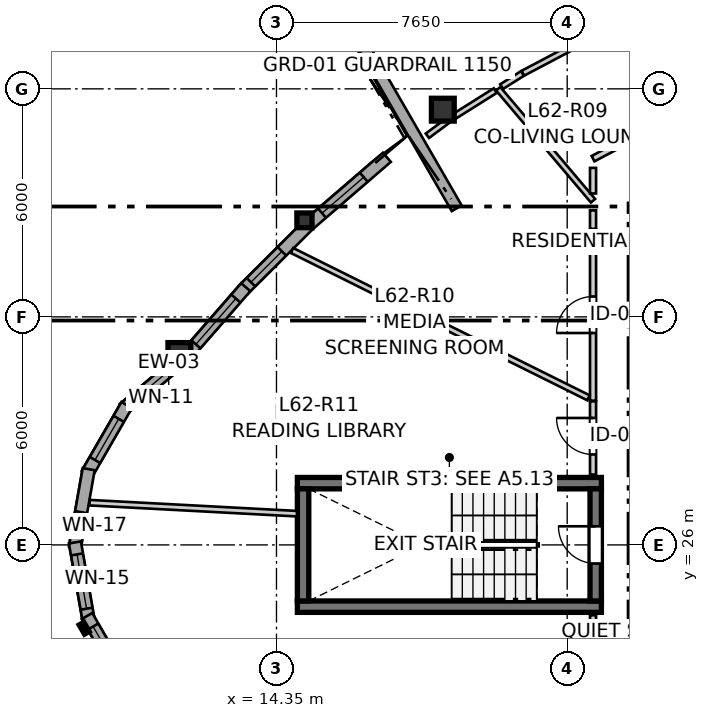
"""IFC4 building model, lengths in metres.
Left out: names, types, materials, properties, quantities, classifications, styles, units other than length and angle.
Written with IfcOpenShell. Run it as: python <this file> out.ifc"""

import sys

from ifc_helpers import new_model, si_unit, direction, frame, frame_2d, origin, origin_2d, place, context, subcontext, project, spatial, rectangle, i_section, extrude, source, transform, mapped, element, fill, save


model = new_model("IFC4")
c1 = context("Model", 3, precision=1e-05, world=origin(), true_north=direction((0.0, 1.0)))
c2 = subcontext(c1, "Body", "Model", "MODEL_VIEW")
j1 = project(units=[si_unit("LENGTHUNIT", "METRE"), si_unit("PLANEANGLEUNIT", "RADIAN")], contexts=[c1])
p1 = place(None, origin())
s1 = spatial("IfcSite", under=j1, at=p1, CompositionType="ELEMENT")
p2 = place(p1, origin())
s2 = spatial("IfcBuilding", under=s1, at=p2, CompositionType="ELEMENT")
p3 = place(p2, frame((0.0, 0.0, 208.4)))
s3 = spatial("IfcBuildingStorey", under=s2, at=p3, CompositionType="ELEMENT", Elevation=208.4)
for number, where, z_axis, x_axis in (
    (1, (14.9, 24.375, 0.0), (0.0, 0.0, 1.0), (1.0, 0.0, 0.0)),
    (2, (22.9, 27.625, 0.0), (0.0, 0.0, 1.0), (-1.0, 0.0, 0.0)),
):
    element("IfcWall", number, at=place(p3, frame(where, z_axis=z_axis, x_axis=x_axis)), inside=s3, PredefinedType="SHEAR", context=c2, shape_type="SweptSolid", body=[
        extrude(rectangle(XDim=8.0, YDim=0.3, at=frame_2d((4.0, 0.0))), origin(), (0.0, 0.0, 1.0), 2.935),
    ])
p4 = place(p3, frame((15.05, 27.475, 0.0), z_axis=(0.0, 0.0, 1.0), x_axis=(0.0, -1.0, 0.0)))
e3 = element("IfcWall", 3, at=p4, inside=s3, PredefinedType="SHEAR", context=c2, shape_type="SweptSolid", body=[
    extrude(rectangle(XDim=2.95, YDim=0.3, at=frame_2d((1.475, 0.0))), origin(), (0.0, 0.0, 1.0), 2.935),
])
p5 = place(p3, frame((22.75, 24.525, 0.0), z_axis=(0.0, 0.0, 1.0), x_axis=(0.0, 1.0, 0.0)))
e4 = element("IfcWall", 4, at=p5, inside=s3, PredefinedType="SHEAR", context=c2, shape_type="SweptSolid", body=[
    extrude(rectangle(XDim=2.95, YDim=0.3, at=frame_2d((1.475, 0.0))), origin(), (0.0, 0.0, 1.0), 2.935),
])
p6 = place(p5, frame((0.985, 0.0, 0.0)))
e5 = element("IfcOpeningElement", 5, at=p6, cuts=e4, PredefinedType="OPENING", context=c2, shape_type="SweptSolid", body=[
    extrude(rectangle(XDim=0.98, YDim=2.15, at=frame_2d((0.49, 1.075))), frame((0.0, 0.16, 0.0), z_axis=(0.0, -1.0, 0.0), x_axis=(1.0, 0.0, 0.0)), (0.0, 0.0, 1.0), 0.32),
])
m1 = source(origin(), c2, "Body", "SweptSolid", [
    extrude(rectangle(XDim=0.6, YDim=0.6, at=origin_2d()), origin(), (0.0, 0.0, 1.0), 2.935),
])
for number, where, z_axis, x_axis in (
    (6, (11.795, 31.023, 0.0), (0.0, 0.0, 1.0), (1.0, 0.0, 0.0)),
    (7, (18.727, 37.452, 0.0), (0.0, 0.0, 1.0), (1.0, 0.0, 0.0)),
):
    element("IfcColumn", number, at=place(p3, frame(where, z_axis=z_axis, x_axis=x_axis)), inside=s3, PredefinedType="COLUMN", context=c2, shape_type="MappedRepresentation", body=[
        mapped(m1, transform((0.0, 0.0, 0.0), x_axis=(1.0, 0.0, 0.0), y_axis=(0.0, 1.0, 0.0), z_axis=(0.0, 0.0, 1.0), scale=1.0)),
    ])
m2 = source(origin(), c2, "Body", "SweptSolid", [
    extrude(i_section(OverallWidth=0.398, OverallDepth=0.387, WebThickness=0.019, FlangeThickness=0.03, FilletRadius=0.015, at=origin_2d()), origin(), (0.0, 0.0, 1.0), 2.935),
])
p7 = place(p3, frame((15.086, 34.541, 0.0), z_axis=(0.0, 0.0, 1.0), x_axis=(1.0, 0.0, 0.0)))
e8 = element("IfcColumn", 8, at=p7, inside=s3, PredefinedType="PILASTER", context=c2, shape_type="MappedRepresentation", body=[
    mapped(m2, transform((0.0, 0.0, 0.0), x_axis=(1.0, 0.0, 0.0), y_axis=(0.0, 1.0, 0.0), z_axis=(0.0, 0.0, 1.0), scale=1.0)),
])
p8 = place(p3, frame((11.829, 30.843, 0.0), z_axis=(0.0, 0.0, 1.0), x_axis=(-0.76606505432, -0.642763045414, 0.0)))
e9 = element("IfcWall", 9, at=p8, inside=s3, PredefinedType="SOLIDWALL", context=c2, shape_type="SweptSolid", body=[
    extrude(rectangle(XDim=1.962, YDim=0.32, at=frame_2d((0.981, 0.0))), origin(), (0.0, 0.0, 1.0), 2.555),
])
p9 = place(p8, frame((0.391, 0.0, 0.82)))
e10 = element("IfcOpeningElement", 10, at=p9, cuts=e9, PredefinedType="OPENING", context=c2, shape_type="SweptSolid", body=[
    extrude(rectangle(XDim=1.25, YDim=1.35, at=frame_2d((0.625, 0.675))), frame((0.0, 0.17, 0.0), z_axis=(0.0, -1.0, 0.0), x_axis=(1.0, 0.0, 0.0)), (0.0, 0.0, 1.0), 0.34),
])
p10 = place(p3, frame((10.409, 29.681, 0.0), z_axis=(0.0, 0.0, 1.0), x_axis=(-0.49990781971, -0.866078617559, 0.0)))
e11 = element("IfcWall", 11, at=p10, inside=s3, PredefinedType="SOLIDWALL", context=c2, shape_type="SweptSolid", body=[
    extrude(rectangle(XDim=2.09, YDim=0.32, at=frame_2d((1.045, 0.0))), origin(), (0.0, 0.0, 1.0), 2.555),
])
p11 = place(p10, frame((0.42, 0.0, 0.82)))
e12 = element("IfcOpeningElement", 12, at=p11, cuts=e11, PredefinedType="OPENING", context=c2, shape_type="SweptSolid", body=[
    extrude(rectangle(XDim=1.25, YDim=1.35, at=frame_2d((0.625, 0.675))), frame((0.0, 0.17, 0.0), z_axis=(0.0, -1.0, 0.0), x_axis=(1.0, 0.0, 0.0)), (0.0, 0.0, 1.0), 0.34),
])
p12 = place(p3, frame((9.409, 27.993, 0.0), z_axis=(0.0, 0.0, 1.0), x_axis=(-0.173672066494, -0.984803540469, 0.0)))
e13 = element("IfcWall", 13, at=p12, inside=s3, PredefinedType="SOLIDWALL", context=c2, shape_type="SweptSolid", body=[
    extrude(rectangle(XDim=2.09, YDim=0.32, at=frame_2d((1.045, 0.0))), origin(), (0.0, 0.0, 1.0), 2.555),
])
p13 = place(p12, frame((1.149, 0.0, 0.82)))
e14 = element("IfcOpeningElement", 14, at=p13, cuts=e13, PredefinedType="OPENING", context=c2, shape_type="SweptSolid", body=[
    extrude(rectangle(XDim=0.58, YDim=1.35, at=frame_2d((0.29, 0.675))), frame((0.0, 0.17, 0.0), z_axis=(0.0, -1.0, 0.0), x_axis=(1.0, 0.0, 0.0)), (0.0, 0.0, 1.0), 0.34),
])
p14 = place(p3, frame((9.046, 26.065, 0.0), z_axis=(0.0, 0.0, 1.0), x_axis=(0.173672066494, -0.984803540469, 0.0)))
e15 = element("IfcWall", 15, at=p14, inside=s3, PredefinedType="SOLIDWALL", context=c2, shape_type="SweptSolid", body=[
    extrude(rectangle(XDim=2.09, YDim=0.32, at=frame_2d((1.045, 0.0))), origin(), (0.0, 0.0, 1.0), 2.555),
])
p15 = place(p14, frame((0.32, 0.0, 0.82)))
e16 = element("IfcOpeningElement", 16, at=p15, cuts=e15, PredefinedType="OPENING", context=c2, shape_type="SweptSolid", body=[
    extrude(rectangle(XDim=1.45, YDim=1.25, at=frame_2d((0.725, 0.625))), frame((0.0, 0.17, 0.0), z_axis=(0.0, -1.0, 0.0), x_axis=(1.0, 0.0, 0.0)), (0.0, 0.0, 1.0), 0.34),
])
p16 = place(p3, frame((9.365, 24.129, 0.0), z_axis=(0.0, 0.0, 1.0), x_axis=(0.49990781971, -0.866078617559, 0.0)))
e17 = element("IfcWall", 17, at=p16, inside=s3, PredefinedType="SOLIDWALL", context=c2, shape_type="SweptSolid", body=[
    extrude(rectangle(XDim=2.09, YDim=0.32, at=frame_2d((1.045, 0.0))), origin(), (0.0, 0.0, 1.0), 2.555),
])
p17 = place(p16, frame((0.32, 0.0, 0.82)))
e18 = element("IfcOpeningElement", 18, at=p17, cuts=e17, PredefinedType="OPENING", context=c2, shape_type="SweptSolid", body=[
    extrude(rectangle(XDim=1.45, YDim=1.25, at=frame_2d((0.725, 0.625))), frame((0.0, 0.17, 0.0), z_axis=(0.0, -1.0, 0.0), x_axis=(1.0, 0.0, 0.0)), (0.0, 0.0, 1.0), 0.34),
])
p18 = place(p3, frame((17.255, 36.199, 0.0), z_axis=(0.0, 0.0, 1.0), x_axis=(-0.757502279287, -0.652832518242, 0.0)))
e19 = element("IfcWall", 19, at=p18, inside=s3, PredefinedType="SOLIDWALL", context=c2, shape_type="SweptSolid", body=[
    extrude(rectangle(XDim=2.706, YDim=0.32, at=frame_2d((1.353, 0.0))), origin(), (0.0, 0.0, 1.0), 2.555),
])
p19 = place(p18, frame((0.803, 0.0, 0.82)))
e20 = element("IfcOpeningElement", 20, at=p19, cuts=e19, PredefinedType="OPENING", context=c2, shape_type="SweptSolid", body=[
    extrude(rectangle(XDim=1.45, YDim=1.25, at=frame_2d((0.725, 0.625))), frame((0.0, 0.17, 0.0), z_axis=(0.0, -1.0, 0.0), x_axis=(1.0, 0.0, 0.0)), (0.0, 0.0, 1.0), 0.34),
])
p20 = place(p3, frame((15.185, 34.413, 0.0), z_axis=(0.0, 0.0, 1.0), x_axis=(-0.70842648029, -0.705784614471, 0.0)))
e21 = element("IfcWall", 21, at=p20, inside=s3, PredefinedType="SOLIDWALL", context=c2, shape_type="SweptSolid", body=[
    extrude(rectangle(XDim=2.403, YDim=0.32, at=frame_2d((1.201, 0.0))), origin(), (0.0, 0.0, 1.0), 2.555),
])
p21 = place(p20, frame((0.976, 0.0, 0.82)))
e22 = element("IfcOpeningElement", 22, at=p21, cuts=e21, PredefinedType="OPENING", context=c2, shape_type="SweptSolid", body=[
    extrude(rectangle(XDim=1.15, YDim=1.2, at=frame_2d((0.575, 0.6))), frame((0.0, 0.17, 0.0), z_axis=(0.0, -1.0, 0.0), x_axis=(1.0, 0.0, 0.0)), (0.0, 0.0, 1.0), 0.34),
])
p22 = place(p3, frame((13.542, 32.781, 0.0), z_axis=(0.0, 0.0, 1.0), x_axis=(-0.657706548736, -0.753274250024, 0.0)))
e23 = element("IfcWall", 23, at=p22, inside=s3, PredefinedType="SOLIDWALL", context=c2, shape_type="SweptSolid", body=[
    extrude(rectangle(XDim=2.384, YDim=0.32, at=frame_2d((1.192, 0.0))), origin(), (0.0, 0.0, 1.0), 2.555),
])
p23 = place(p22, frame((0.397, 0.0, 0.82)))
e24 = element("IfcOpeningElement", 24, at=p23, cuts=e23, PredefinedType="OPENING", context=c2, shape_type="SweptSolid", body=[
    extrude(rectangle(XDim=1.6, YDim=1.35, at=frame_2d((0.8, 0.675))), frame((0.0, 0.17, 0.0), z_axis=(0.0, -1.0, 0.0), x_axis=(1.0, 0.0, 0.0)), (0.0, 0.0, 1.0), 0.34),
])
p24 = place(p3, frame((19.093, 34.858, 0.0), z_axis=(0.0, 0.0, 1.0), x_axis=(-0.499994279776, 0.866028706332, 0.0)))
e25 = element("IfcWall", 25, at=p24, inside=s3, PredefinedType="SOLIDWALL", context=c2, shape_type="SweptSolid", body=[
    extrude(rectangle(XDim=19.929, YDim=0.3, at=frame_2d((9.964, 0.0))), origin(), (0.0, 0.0, 1.0), 2.115),
])
p25 = place(p3, frame((22.68, 19.52, 0.0), z_axis=(0.0, 0.0, 1.0), x_axis=(0.0, 1.0, 0.0)))
e26 = element("IfcWall", 26, at=p25, inside=s3, PredefinedType="PARTITIONING", context=c2, shape_type="SweptSolid", body=[
    extrude(rectangle(XDim=4.63, YDim=0.16, at=frame_2d((2.315, 0.0))), origin(), (0.0, 0.0, 1.0), 2.935),
])
p26 = place(p25, frame((1.357, 0.0, 0.0)))
e27 = element("IfcOpeningElement", 27, at=p26, cuts=e26, PredefinedType="OPENING", context=c2, shape_type="SweptSolid", body=[
    extrude(rectangle(XDim=1.3, YDim=2.1, at=frame_2d((0.65, 1.05))), frame((0.0, 0.09, 0.0), z_axis=(0.0, -1.0, 0.0), x_axis=(1.0, 0.0, 0.0)), (0.0, 0.0, 1.0), 0.18),
])
p27 = place(p3, frame((22.68, 29.794, 0.0), z_axis=(0.0, 0.0, 1.0), x_axis=(0.0, 1.0, 0.0)))
e28 = element("IfcWall", 28, at=p27, inside=s3, PredefinedType="PARTITIONING", context=c2, shape_type="SweptSolid", body=[
    extrude(rectangle(XDim=4.506, YDim=0.16, at=frame_2d((2.253, 0.0))), origin(), (0.0, 0.0, 1.0), 2.935),
])
p28 = place(p27, frame((1.781, 0.0, 0.0)))
e29 = element("IfcOpeningElement", 29, at=p28, cuts=e28, PredefinedType="OPENING", context=c2, shape_type="SweptSolid", body=[
    extrude(rectangle(XDim=0.96, YDim=2.1, at=frame_2d((0.48, 1.05))), frame((0.0, 0.09, 0.0), z_axis=(0.0, -1.0, 0.0), x_axis=(1.0, 0.0, 0.0)), (0.0, 0.0, 1.0), 0.18),
])
p29 = place(p3, frame((22.68, 27.85, 0.0), z_axis=(0.0, 0.0, 1.0), x_axis=(0.0, 1.0, 0.0)))
e30 = element("IfcWall", 30, at=p29, inside=s3, PredefinedType="PARTITIONING", context=c2, shape_type="SweptSolid", body=[
    extrude(rectangle(XDim=1.929, YDim=0.16, at=frame_2d((0.964, 0.0))), origin(), (0.0, 0.0, 1.0), 2.935),
])
p30 = place(p29, frame((0.53, 0.0, 0.0)))
e31 = element("IfcOpeningElement", 31, at=p30, cuts=e30, PredefinedType="OPENING", context=c2, shape_type="SweptSolid", body=[
    extrude(rectangle(XDim=0.96, YDim=2.1, at=frame_2d((0.48, 1.05))), frame((0.0, 0.09, 0.0), z_axis=(0.0, -1.0, 0.0), x_axis=(1.0, 0.0, 0.0)), (0.0, 0.0, 1.0), 0.18),
])
p31 = place(p3, frame((14.759, 33.747, 0.0), z_axis=(0.0, 0.0, 1.0), x_axis=(0.895550902793, -0.44495907734, 0.0)))
e32 = element("IfcWall", 32, at=p31, inside=s3, PredefinedType="PARTITIONING", context=c2, shape_type="SweptSolid", body=[
    extrude(rectangle(XDim=8.712, YDim=0.145, at=frame_2d((4.356, 0.0))), origin(), (0.0, 0.0, 1.0), 2.935),
])
p32 = place(p3, frame((9.433, 27.112, 0.0), z_axis=(0.0, 0.0, 1.0), x_axis=(0.998589537807, -0.053093643525, 0.0)))
e33 = element("IfcWall", 33, at=p32, inside=s3, PredefinedType="PARTITIONING", context=c2, shape_type="SweptSolid", body=[
    extrude(rectangle(XDim=5.463, YDim=0.145, at=frame_2d((2.731, 0.0))), origin(), (0.0, 0.0, 1.0), 2.935),
])
p33 = place(p3, frame((20.184, 38.002, 0.0), z_axis=(0.0, 0.0, 1.0), x_axis=(0.646276580378, -0.763103257531, 0.0)))
e34 = element("IfcWall", 34, at=p33, inside=s3, PredefinedType="PARTITIONING", context=c2, shape_type="SweptSolid", body=[
    extrude(rectangle(XDim=3.862, YDim=0.145, at=frame_2d((1.931, 0.0))), origin(), (0.0, 0.0, 1.0), 2.935),
])
p34 = place(p3, frame((20.834, 38.411, 0.0), z_axis=(0.0, 0.0, 1.0), x_axis=(0.884282286127, 0.466952715425, 0.0)))
e35 = element("IfcWall", 35, at=p34, inside=s3, PredefinedType="PARTITIONING", context=c2, shape_type="SweptSolid", body=[
    extrude(rectangle(XDim=2.268, YDim=0.145, at=frame_2d((1.134, 0.0))), origin(), (0.0, 0.0, 1.0), 2.543),
])
p35 = place(p3, frame((22.68, 36.163, 0.0), z_axis=(0.0, 0.0, 1.0), x_axis=(0.884428711586, 0.466675319812, 0.0)))
e36 = element("IfcWall", 36, at=p35, inside=s3, PredefinedType="PARTITIONING", context=c2, shape_type="SweptSolid", body=[
    extrude(rectangle(XDim=1.592, YDim=0.16, at=frame_2d((0.796, 0.0))), origin(), (0.0, 0.0, 1.0), 2.935),
])
p36 = place(p3, frame((18.902, 37.196, 0.0), z_axis=(0.0, 0.0, 1.0), x_axis=(0.846539334405, 0.532326173794, 0.0)))
e37 = element("IfcWall", 37, at=p36, inside=s3, PredefinedType="PARTITIONING", context=c2, shape_type="SweptSolid", body=[
    extrude(rectangle(XDim=1.423, YDim=0.145, at=frame_2d((0.711, 0.0))), origin(), (0.0, 0.0, 1.0), 2.543),
])
p37 = place(p3, frame((22.68, 35.247, 0.0), z_axis=(0.0, 0.0, 1.0), x_axis=(0.0, 1.0, 0.0)))
e38 = element("IfcWall", 38, at=p37, inside=s3, PredefinedType="PARTITIONING", context=c2, shape_type="SweptSolid", body=[
    extrude(rectangle(XDim=0.673, YDim=0.16, at=frame_2d((0.337, 0.0))), origin(), (0.0, 0.0, 1.0), 2.935),
])
p38 = place(p3, frame((20.274, 38.059, 0.0), z_axis=(0.0, 0.0, 1.0), x_axis=(0.84623284009, 0.532813269686, 0.0)))
e39 = element("IfcWall", 39, at=p38, inside=s3, PredefinedType="PARTITIONING", context=c2, shape_type="SweptSolid", body=[
    extrude(rectangle(XDim=0.646, YDim=0.145, at=frame_2d((0.323, 0.0))), origin(), (0.0, 0.0, 1.0), 2.543),
])
p39 = place(p3, frame((18.321, 36.766, 0.0), z_axis=(0.0, 0.0, 1.0), x_axis=(0.80387489201, 0.594798417951, 0.0)))
e40 = element("IfcWall", 40, at=p39, inside=s3, PredefinedType="PARTITIONING", context=c2, shape_type="SweptSolid", body=[
    extrude(rectangle(XDim=0.708, YDim=0.145, at=frame_2d((0.354, 0.0))), origin(), (0.0, 0.0, 1.0), 2.543),
])
p40 = place(p3, frame((22.68, 34.315, 0.0), z_axis=(0.0, 0.0, 1.0), x_axis=(0.0, 1.0, 0.0)))
e41 = element("IfcWall", 41, at=p40, inside=s3, PredefinedType="PARTITIONING", context=c2, shape_type="SweptSolid", body=[
    extrude(rectangle(XDim=0.488, YDim=0.16, at=frame_2d((0.244, 0.0))), origin(), (0.0, 0.0, 1.0), 2.935),
])
m3 = source(origin(), c2, "Body", "SweptSolid", [
    extrude(rectangle(XDim=1.25, YDim=1.35, at=frame_2d((0.625, 0.675))), frame((0.0, 0.03, 0.0), z_axis=(0.0, -1.0, 0.0), x_axis=(1.0, 0.0, 0.0)), (0.0, 0.0, 1.0), 0.06),
])
p41 = place(p9, origin())
e42 = element("IfcWindow", 42, at=p41, inside=s3, PartitioningType="SINGLE_PANEL", PredefinedType="WINDOW", context=c2, shape_type="MappedRepresentation", body=[
    mapped(m3, transform((0.0, 0.0, 0.0), x_axis=(1.0, 0.0, 0.0), y_axis=(0.0, 1.0, 0.0), z_axis=(0.0, 0.0, 1.0), scale=1.0)),
])
fill(e10, e42)
p42 = place(p11, origin())
e43 = element("IfcWindow", 43, at=p42, inside=s3, PartitioningType="SINGLE_PANEL", PredefinedType="WINDOW", context=c2, shape_type="MappedRepresentation", body=[
    mapped(m3, transform((0.0, 0.0, 0.0), x_axis=(1.0, 0.0, 0.0), y_axis=(0.0, 1.0, 0.0), z_axis=(0.0, 0.0, 1.0), scale=1.0)),
])
fill(e12, e43)
m4 = source(origin(), c2, "Body", "SweptSolid", [
    extrude(rectangle(XDim=0.58, YDim=1.35, at=frame_2d((0.29, 0.675))), frame((0.0, 0.03, 0.0), z_axis=(0.0, -1.0, 0.0), x_axis=(1.0, 0.0, 0.0)), (0.0, 0.0, 1.0), 0.06),
])
p43 = place(p13, origin())
e44 = element("IfcWindow", 44, at=p43, inside=s3, PartitioningType="SINGLE_PANEL", PredefinedType="WINDOW", context=c2, shape_type="MappedRepresentation", body=[
    mapped(m4, transform((0.0, 0.0, 0.0), x_axis=(1.0, 0.0, 0.0), y_axis=(0.0, 1.0, 0.0), z_axis=(0.0, 0.0, 1.0), scale=1.0)),
])
fill(e14, e44)
m5 = source(origin(), c2, "Body", "SweptSolid", [
    extrude(rectangle(XDim=1.45, YDim=1.25, at=frame_2d((0.725, 0.625))), frame((0.0, 0.03, 0.0), z_axis=(0.0, -1.0, 0.0), x_axis=(1.0, 0.0, 0.0)), (0.0, 0.0, 1.0), 0.06),
])
p44 = place(p15, origin())
e45 = element("IfcWindow", 45, at=p44, inside=s3, PartitioningType="SINGLE_PANEL", PredefinedType="WINDOW", context=c2, shape_type="MappedRepresentation", body=[
    mapped(m5, transform((0.0, 0.0, 0.0), x_axis=(1.0, 0.0, 0.0), y_axis=(0.0, 1.0, 0.0), z_axis=(0.0, 0.0, 1.0), scale=1.0)),
])
fill(e16, e45)
p45 = place(p17, origin())
e46 = element("IfcWindow", 46, at=p45, inside=s3, PartitioningType="SINGLE_PANEL", PredefinedType="WINDOW", context=c2, shape_type="MappedRepresentation", body=[
    mapped(m5, transform((0.0, 0.0, 0.0), x_axis=(1.0, 0.0, 0.0), y_axis=(0.0, 1.0, 0.0), z_axis=(0.0, 0.0, 1.0), scale=1.0)),
])
fill(e18, e46)
p46 = place(p19, origin())
e47 = element("IfcWindow", 47, at=p46, inside=s3, PartitioningType="SINGLE_PANEL", PredefinedType="WINDOW", context=c2, shape_type="MappedRepresentation", body=[
    mapped(m5, transform((0.0, 0.0, 0.0), x_axis=(1.0, 0.0, 0.0), y_axis=(0.0, 1.0, 0.0), z_axis=(0.0, 0.0, 1.0), scale=1.0)),
])
fill(e20, e47)
m6 = source(origin(), c2, "Body", "SweptSolid", [
    extrude(rectangle(XDim=1.15, YDim=1.2, at=frame_2d((0.575, 0.6))), frame((0.0, 0.03, 0.0), z_axis=(0.0, -1.0, 0.0), x_axis=(1.0, 0.0, 0.0)), (0.0, 0.0, 1.0), 0.06),
])
p47 = place(p21, origin())
e48 = element("IfcWindow", 48, at=p47, inside=s3, PartitioningType="SINGLE_PANEL", PredefinedType="WINDOW", context=c2, shape_type="MappedRepresentation", body=[
    mapped(m6, transform((0.0, 0.0, 0.0), x_axis=(1.0, 0.0, 0.0), y_axis=(0.0, 1.0, 0.0), z_axis=(0.0, 0.0, 1.0), scale=1.0)),
])
fill(e22, e48)
m7 = source(origin(), c2, "Body", "SweptSolid", [
    extrude(rectangle(XDim=1.6, YDim=1.35, at=frame_2d((0.8, 0.675))), frame((0.0, 0.03, 0.0), z_axis=(0.0, -1.0, 0.0), x_axis=(1.0, 0.0, 0.0)), (0.0, 0.0, 1.0), 0.06),
])
p48 = place(p23, origin())
e49 = element("IfcWindow", 49, at=p48, inside=s3, PartitioningType="SINGLE_PANEL", PredefinedType="WINDOW", context=c2, shape_type="MappedRepresentation", body=[
    mapped(m7, transform((0.0, 0.0, 0.0), x_axis=(1.0, 0.0, 0.0), y_axis=(0.0, 1.0, 0.0), z_axis=(0.0, 0.0, 1.0), scale=1.0)),
])
fill(e24, e49)
m8 = source(origin(), c2, "Body", "SweptSolid", [
    extrude(rectangle(XDim=0.98, YDim=2.15, at=frame_2d((0.49, 1.075))), frame((0.0, 0.025, 0.0), z_axis=(0.0, -1.0, 0.0), x_axis=(1.0, 0.0, 0.0)), (0.0, 0.0, 1.0), 0.05),
])
p49 = place(p6, origin())
e50 = element("IfcDoor", 50, at=p49, inside=s3, OperationType="SINGLE_SWING_RIGHT", PredefinedType="DOOR", context=c2, shape_type="MappedRepresentation", body=[
    mapped(m8, transform((0.0, 0.0, 0.0), x_axis=(1.0, 0.0, 0.0), y_axis=(0.0, 1.0, 0.0), z_axis=(0.0, 0.0, 1.0), scale=1.0)),
])
fill(e5, e50)
m9 = source(origin(), c2, "Body", "SweptSolid", [
    extrude(rectangle(XDim=0.96, YDim=2.1, at=frame_2d((0.48, 1.05))), frame((0.0, 0.025, 0.0), z_axis=(0.0, -1.0, 0.0), x_axis=(1.0, 0.0, 0.0)), (0.0, 0.0, 1.0), 0.05),
])
p50 = place(p28, origin())
e51 = element("IfcDoor", 51, at=p50, inside=s3, OperationType="SINGLE_SWING_LEFT", PredefinedType="DOOR", context=c2, shape_type="MappedRepresentation", body=[
    mapped(m9, transform((0.0, 0.0, 0.0), x_axis=(1.0, 0.0, 0.0), y_axis=(0.0, 1.0, 0.0), z_axis=(0.0, 0.0, 1.0), scale=1.0)),
])
fill(e29, e51)
p51 = place(p30, origin())
e52 = element("IfcDoor", 52, at=p51, inside=s3, OperationType="SINGLE_SWING_RIGHT", PredefinedType="DOOR", context=c2, shape_type="MappedRepresentation", body=[
    mapped(m9, transform((0.0, 0.0, 0.0), x_axis=(1.0, 0.0, 0.0), y_axis=(0.0, 1.0, 0.0), z_axis=(0.0, 0.0, 1.0), scale=1.0)),
])
fill(e31, e52)
save(model, sys.argv[1])
